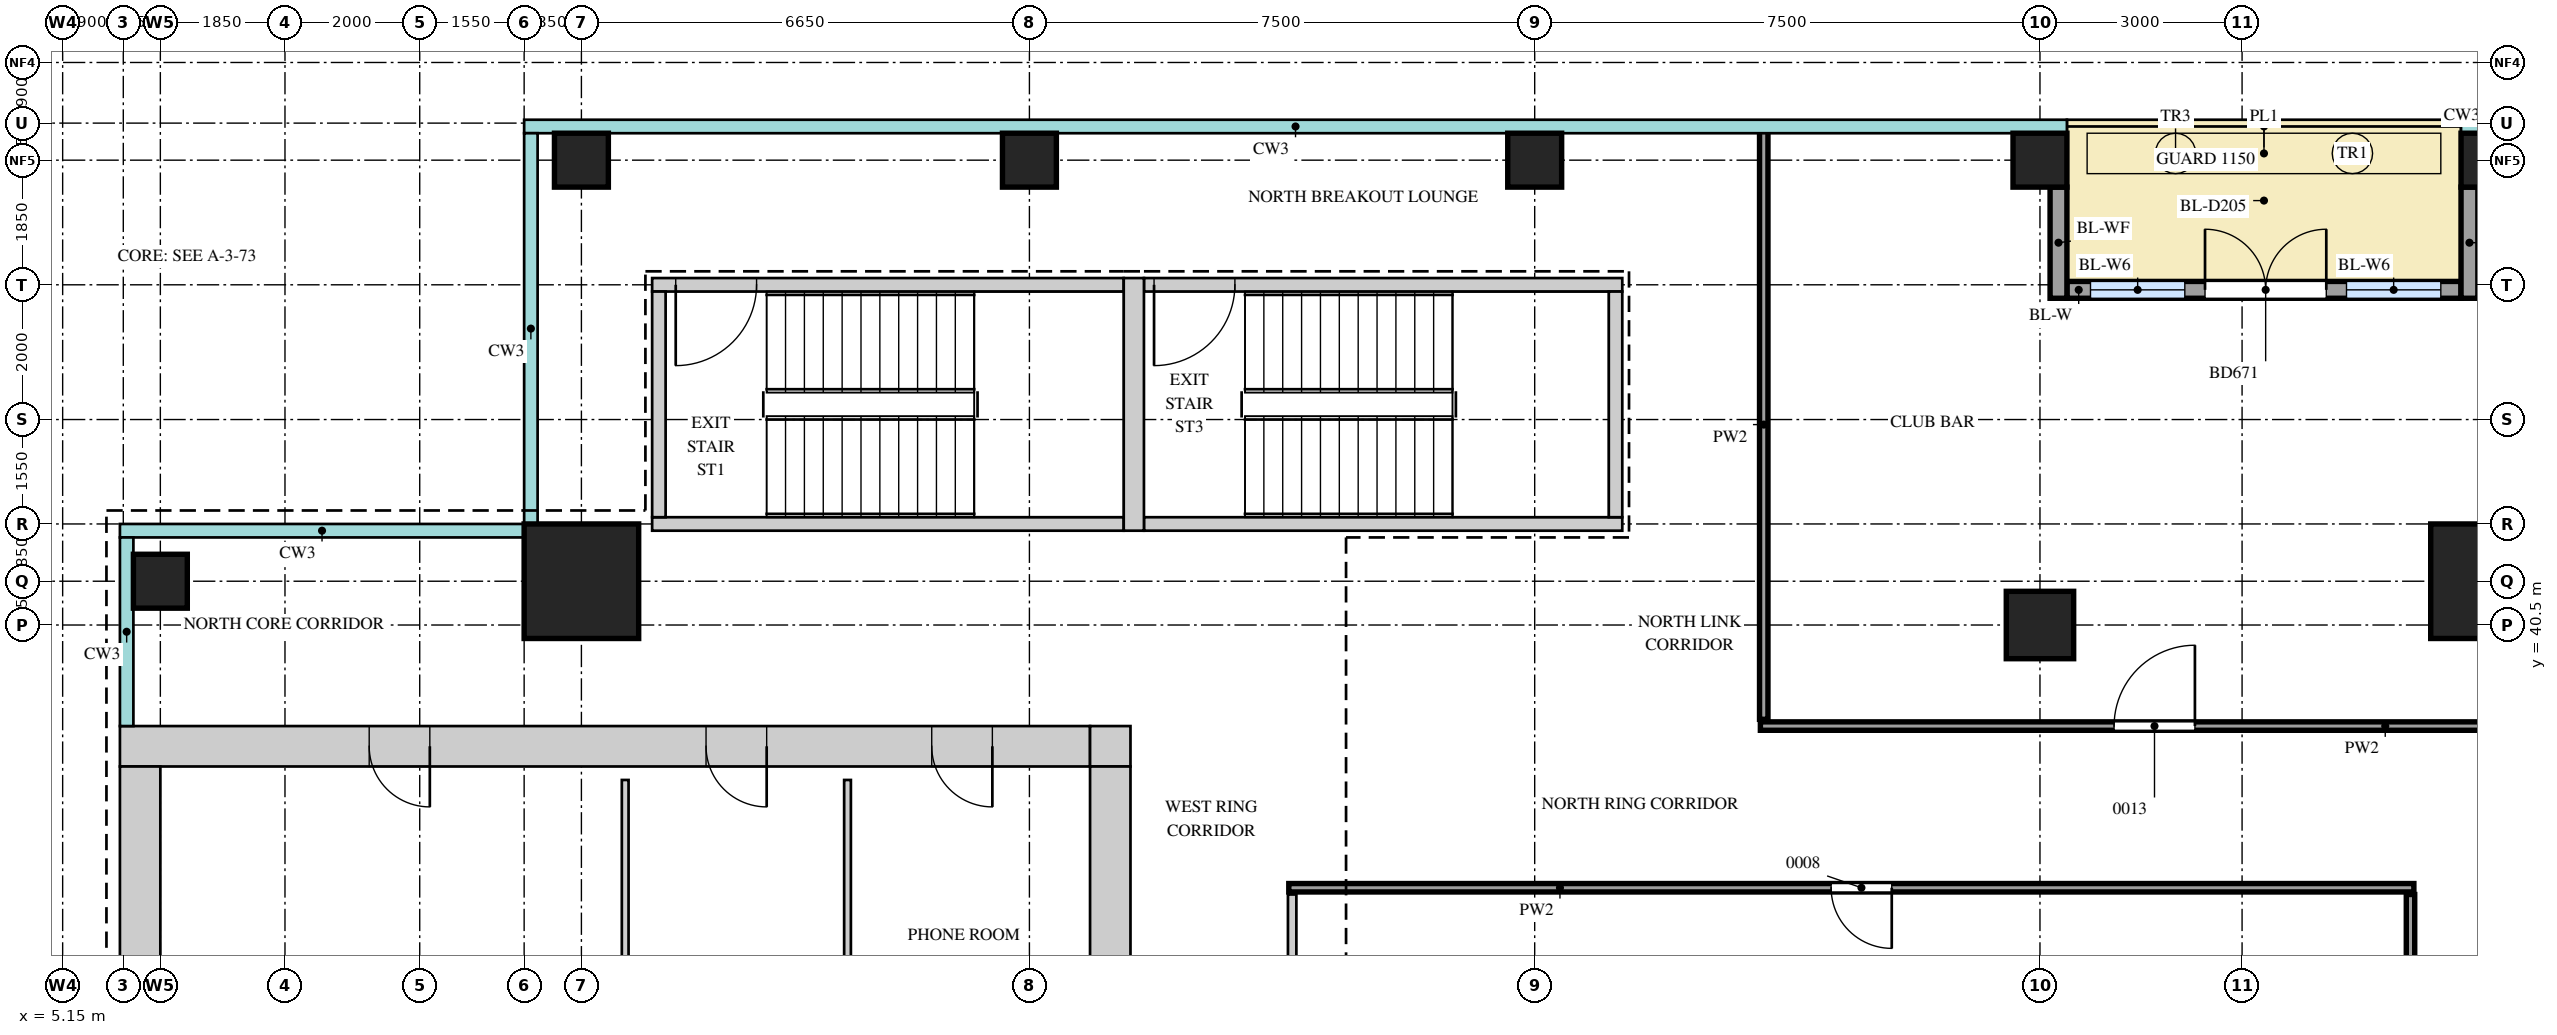
"""IFC4 building model, lengths in metres.
Left out: names, types, materials, properties, quantities, classifications, styles, units other than length and angle.
Written with IfcOpenShell. Run it as: python <this file> out.ifc"""

import sys

from ifc_helpers import new_model, si_unit, direction, frame, frame_2d, origin, origin_2d, place, context, subcontext, project, spatial, rectangle, extrude, source, transform, mapped, element, fill, save


model = new_model("IFC4")
c1 = context("Model", 3, precision=1e-05, world=origin(), true_north=direction((0.0, 1.0)))
c2 = subcontext(c1, "Body", "Model", "MODEL_VIEW")
j1 = project(units=[si_unit("LENGTHUNIT", "METRE"), si_unit("PLANEANGLEUNIT", "RADIAN")], contexts=[c1])
p1 = place(None, origin())
s1 = spatial("IfcSite", under=j1, at=p1, CompositionType="ELEMENT")
p2 = place(p1, origin())
s2 = spatial("IfcBuilding", under=s1, at=p2, CompositionType="ELEMENT")
p3 = place(p2, frame((0.0, 0.0, 298.2)))
s3 = spatial("IfcBuildingStorey", under=s2, at=p3, CompositionType="ELEMENT", Elevation=298.2)
m1 = source(origin(), c2, "Body", "SweptSolid", [
    extrude(rectangle(XDim=14.4, YDim=0.6, at=frame_2d((7.2, 0.0))), origin(), (0.0, 0.0, 1.0), 3.75),
])
p4 = place(p3, frame((6.0, 38.7, 0.0), z_axis=(0.0, 0.0, 1.0), x_axis=(1.0, 0.0, 0.0)))
e1 = element("IfcWall", 1, at=p4, inside=s3, PredefinedType="SHEAR", context=c2, shape_type="MappedRepresentation", body=[
    mapped(m1, transform((0.0, 0.0, 0.0))),
])
m2 = source(origin(), c2, "Body", "SweptSolid", [
    extrude(rectangle(XDim=0.9, YDim=2.1, at=frame_2d((0.45, 1.05))), frame((0.0, 0.31, 0.0), z_axis=(0.0, -1.0, 0.0), x_axis=(1.0, 0.0, 0.0)), (0.0, 0.0, 1.0), 0.62),
])
p5 = place(p4, frame((3.7, 0.0, 0.0)))
e2 = element("IfcOpeningElement", 2, at=p5, cuts=e1, PredefinedType="OPENING", context=c2, shape_type="MappedRepresentation", body=[
    mapped(m2, transform((0.0, 0.0, 0.0))),
])
p6 = place(p4, frame((8.7, 0.0, 0.0)))
e3 = element("IfcOpeningElement", 3, at=p6, cuts=e1, PredefinedType="OPENING", context=c2, shape_type="MappedRepresentation", body=[
    mapped(m2, transform((0.0, 0.0, 0.0))),
])
p7 = place(p4, frame((12.05, 0.0, 0.0)))
e4 = element("IfcOpeningElement", 4, at=p7, cuts=e1, PredefinedType="OPENING", context=c2, shape_type="MappedRepresentation", body=[
    mapped(m2, transform((0.0, 0.0, 0.0))),
])
m3 = source(origin(), c2, "Body", "SweptSolid", [
    extrude(rectangle(XDim=0.6, YDim=0.6, at=frame_2d((0.3, 0.0))), origin(), (0.0, 0.0, 1.0), 3.75),
])
p8 = place(p3, frame((20.4, 38.7, 0.0), z_axis=(0.0, 0.0, 1.0), x_axis=(1.0, 0.0, 0.0)))
e5 = element("IfcWall", 5, at=p8, inside=s3, PredefinedType="SHEAR", context=c2, shape_type="MappedRepresentation", body=[
    mapped(m3, transform((0.0, 0.0, 0.0))),
])
m4 = source(origin(), c2, "Body", "SweptSolid", [
    extrude(rectangle(XDim=22.8, YDim=0.6, at=frame_2d((11.4, 0.0))), origin(), (0.0, 0.0, 1.0), 3.75),
])
p9 = place(p3, frame((20.7, 15.6, 0.0), z_axis=(0.0, 0.0, 1.0), x_axis=(0.0, 1.0, 0.0)))
e6 = element("IfcWall", 6, at=p9, inside=s3, PredefinedType="SHEAR", context=c2, shape_type="MappedRepresentation", body=[
    mapped(m4, transform((0.0, 0.0, 0.0))),
])
m5 = source(origin(), c2, "Body", "SweptSolid", [
    extrude(rectangle(XDim=1.8, YDim=2.1, at=frame_2d((0.9, 1.05))), frame((0.0, 0.31, 0.0), z_axis=(0.0, -1.0, 0.0), x_axis=(1.0, 0.0, 0.0)), (0.0, 0.0, 1.0), 0.62),
])
p10 = place(p9, frame((10.9, 0.0, 0.0)))
e7 = element("IfcOpeningElement", 7, at=p10, cuts=e6, PredefinedType="OPENING", context=c2, shape_type="MappedRepresentation", body=[
    mapped(m5, transform((0.0, 0.0, 0.0))),
])
p11 = place(p9, frame((0.55, 0.0, 0.0)))
e8 = element("IfcOpeningElement", 8, at=p11, cuts=e6, PredefinedType="OPENING", context=c2, shape_type="MappedRepresentation", body=[
    mapped(m2, transform((0.0, 0.0, 0.0))),
])
p12 = place(p9, frame((4.1, 0.0, 0.0)))
e9 = element("IfcOpeningElement", 9, at=p12, cuts=e6, PredefinedType="OPENING", context=c2, shape_type="MappedRepresentation", body=[
    mapped(m2, transform((0.0, 0.0, 0.0))),
])
p13 = place(p3, frame((6.3, 15.6, 0.0), z_axis=(0.0, 0.0, 1.0), x_axis=(0.0, 1.0, 0.0)))
e10 = element("IfcWall", 10, at=p13, inside=s3, PredefinedType="SHEAR", context=c2, shape_type="MappedRepresentation", body=[
    mapped(m4, transform((0.0, 0.0, 0.0))),
])
m6 = source(origin(), c2, "Body", "SweptSolid", [
    extrude(rectangle(XDim=7.0, YDim=0.2, at=frame_2d((3.5, 0.0))), origin(), (0.0, 0.0, 1.0), 3.75),
])
p14 = place(p3, frame((13.9, 45.55, 0.0), z_axis=(0.0, 0.0, 1.0), x_axis=(1.0, 0.0, 0.0)))
e11 = element("IfcWall", 11, at=p14, inside=s3, PredefinedType="SHEAR", context=c2, shape_type="MappedRepresentation", body=[
    mapped(m6, transform((0.0, 0.0, 0.0))),
])
m7 = source(origin(), c2, "Body", "SweptSolid", [
    extrude(rectangle(XDim=1.2, YDim=2.1, at=frame_2d((0.6, 1.05))), frame((0.0, 0.11, 0.0), z_axis=(0.0, -1.0, 0.0), x_axis=(1.0, 0.0, 0.0)), (0.0, 0.0, 1.0), 0.22),
])
p15 = place(p14, frame((0.35, 0.0, 0.0)))
e12 = element("IfcOpeningElement", 12, at=p15, cuts=e11, PredefinedType="OPENING", context=c2, shape_type="MappedRepresentation", body=[
    mapped(m7, transform((0.0, 0.0, 0.0))),
])
p16 = place(p3, frame((13.9, 42.0, 0.0), z_axis=(0.0, 0.0, 1.0), x_axis=(1.0, 0.0, 0.0)))
e13 = element("IfcWall", 13, at=p16, inside=s3, PredefinedType="SHEAR", context=c2, shape_type="MappedRepresentation", body=[
    mapped(m6, transform((0.0, 0.0, 0.0))),
])
m8 = source(origin(), c2, "Body", "SweptSolid", [
    extrude(rectangle(XDim=7.1, YDim=0.2, at=frame_2d((3.55, 0.0))), origin(), (0.0, 0.0, 1.0), 3.75),
])
p17 = place(p3, frame((21.2, 45.55, 0.0), z_axis=(0.0, 0.0, 1.0), x_axis=(1.0, 0.0, 0.0)))
e14 = element("IfcWall", 14, at=p17, inside=s3, PredefinedType="SHEAR", context=c2, shape_type="MappedRepresentation", body=[
    mapped(m8, transform((0.0, 0.0, 0.0))),
])
p18 = place(p17, frame((0.15, 0.0, 0.0)))
e15 = element("IfcOpeningElement", 15, at=p18, cuts=e14, PredefinedType="OPENING", context=c2, shape_type="MappedRepresentation", body=[
    mapped(m7, transform((0.0, 0.0, 0.0))),
])
p19 = place(p3, frame((21.2, 42.0, 0.0), z_axis=(0.0, 0.0, 1.0), x_axis=(1.0, 0.0, 0.0)))
e16 = element("IfcWall", 16, at=p19, inside=s3, PredefinedType="SHEAR", context=c2, shape_type="MappedRepresentation", body=[
    mapped(m8, transform((0.0, 0.0, 0.0))),
])
m9 = source(origin(), c2, "Body", "SweptSolid", [
    extrude(rectangle(XDim=3.75, YDim=0.3, at=frame_2d((1.875, 0.0))), origin(), (0.0, 0.0, 1.0), 3.75),
])
p20 = place(p3, frame((21.05, 41.9, 0.0), z_axis=(0.0, 0.0, 1.0), x_axis=(0.0, 1.0, 0.0)))
e17 = element("IfcWall", 17, at=p20, inside=s3, PredefinedType="SHEAR", context=c2, shape_type="MappedRepresentation", body=[
    mapped(m9, transform((0.0, 0.0, 0.0))),
])
m10 = source(origin(), c2, "Body", "SweptSolid", [
    extrude(rectangle(XDim=3.35, YDim=0.2, at=frame_2d((1.675, 0.0))), origin(), (0.0, 0.0, 1.0), 3.75),
])
for number, where, z_axis, x_axis in (
    (18, (14.0, 42.1, 0.0), (0.0, 0.0, 1.0), (0.0, 1.0, 0.0)),
    (19, (28.2, 42.1, 0.0), (0.0, 0.0, 1.0), (0.0, 1.0, 0.0)),
):
    element("IfcWall", number, at=place(p3, frame(where, z_axis=z_axis, x_axis=x_axis)), inside=s3, PredefinedType="SHEAR", context=c2, shape_type="MappedRepresentation", body=[
        mapped(m10, transform((0.0, 0.0, 0.0))),
    ])
m11 = source(origin(), c2, "Body", "SweptSolid", [
    extrude(rectangle(XDim=1.7, YDim=1.7, at=origin_2d()), origin(), (0.0, 0.0, 1.0), 3.75),
])
for number, where, z_axis, x_axis in (
    (20, (41.15, 41.15, 0.0), (0.0, 0.0, 1.0), (1.0, 0.0, 0.0)),
    (21, (12.85, 41.15, 0.0), (0.0, 0.0, 1.0), (1.0, 0.0, 0.0)),
):
    element("IfcColumn", number, at=place(p3, frame(where, z_axis=z_axis, x_axis=x_axis)), inside=s3, PredefinedType="COLUMN", context=c2, shape_type="MappedRepresentation", body=[
        mapped(m11, transform((0.0, 0.0, 0.0))),
    ])
m12 = source(origin(), c2, "Body", "SweptSolid", [
    extrude(rectangle(XDim=0.8, YDim=0.8, at=origin_2d()), origin(), (0.0, 0.0, 1.0), 3.75),
])
for number, where, z_axis, x_axis in (
    (22, (12.85, 47.4, 0.0), (0.0, 0.0, 1.0), (1.0, 0.0, 0.0)),
    (23, (19.5, 47.4, 0.0), (0.0, 0.0, 1.0), (1.0, 0.0, 0.0)),
    (24, (27.0, 47.4, 0.0), (0.0, 0.0, 1.0), (1.0, 0.0, 0.0)),
    (25, (34.5, 47.4, 0.0), (0.0, 0.0, 1.0), (1.0, 0.0, 0.0)),
    (26, (41.15, 47.4, 0.0), (0.0, 0.0, 1.0), (1.0, 0.0, 0.0)),
    (27, (6.6, 41.15, 0.0), (0.0, 0.0, 1.0), (1.0, 0.0, 0.0)),
):
    element("IfcColumn", number, at=place(p3, frame(where, z_axis=z_axis, x_axis=x_axis)), inside=s3, PredefinedType="COLUMN", context=c2, shape_type="MappedRepresentation", body=[
        mapped(m12, transform((0.0, 0.0, 0.0))),
    ])
m13 = source(origin(), c2, "Body", "SweptSolid", [
    extrude(rectangle(XDim=1.0, YDim=1.0, at=origin_2d()), origin(), (0.0, 0.0, 1.0), 3.75),
])
p21 = place(p3, frame((34.5, 40.5, 0.0), z_axis=(0.0, 0.0, 1.0), x_axis=(1.0, 0.0, 0.0)))
e28 = element("IfcColumn", 28, at=p21, inside=s3, PredefinedType="COLUMN", context=c2, shape_type="MappedRepresentation", body=[
    mapped(m13, transform((0.0, 0.0, 0.0))),
])
m14 = source(origin(), c2, "Body", "SweptSolid", [
    extrude(rectangle(XDim=5.85, YDim=0.25, at=frame_2d((2.925, 0.0))), origin(), (0.0, 0.0, 1.0), 3.75),
])
p22 = place(p3, frame((34.9, 45.475, 0.0), z_axis=(0.0, 0.0, 1.0), x_axis=(1.0, 0.0, 0.0)))
e29 = element("IfcWall", 29, at=p22, inside=s3, PredefinedType="SOLIDWALL", context=c2, shape_type="MappedRepresentation", body=[
    mapped(m14, transform((0.0, 0.0, 0.0))),
])
m15 = source(origin(), c2, "Body", "SweptSolid", [
    extrude(rectangle(XDim=1.4, YDim=2.4, at=frame_2d((0.7, 1.2))), frame((0.0, 0.135, 0.0), z_axis=(0.0, -1.0, 0.0), x_axis=(1.0, 0.0, 0.0)), (0.0, 0.0, 1.0), 0.27),
])
p23 = place(p22, frame((0.35, 0.0, 0.0)))
e30 = element("IfcOpeningElement", 30, at=p23, cuts=e29, PredefinedType="OPENING", context=c2, shape_type="MappedRepresentation", body=[
    mapped(m15, transform((0.0, 0.0, 0.0))),
])
p24 = place(p22, frame((4.15, 0.0, 0.0)))
e31 = element("IfcOpeningElement", 31, at=p24, cuts=e29, PredefinedType="OPENING", context=c2, shape_type="MappedRepresentation", body=[
    mapped(m15, transform((0.0, 0.0, 0.0))),
])
m16 = source(origin(), c2, "Body", "SweptSolid", [
    extrude(rectangle(XDim=1.8, YDim=2.4, at=frame_2d((0.9, 1.2))), frame((0.0, 0.135, 0.0), z_axis=(0.0, -1.0, 0.0), x_axis=(1.0, 0.0, 0.0)), (0.0, 0.0, 1.0), 0.27),
])
p25 = place(p22, frame((2.05, 0.0, 0.0)))
e32 = element("IfcOpeningElement", 32, at=p25, cuts=e29, PredefinedType="OPENING", context=c2, shape_type="MappedRepresentation", body=[
    mapped(m16, transform((0.0, 0.0, 0.0))),
])
m17 = source(origin(), c2, "Body", "SweptSolid", [
    extrude(rectangle(XDim=1.65, YDim=0.25, at=frame_2d((0.825, 0.0))), origin(), (0.0, 0.0, 1.0), 3.45),
])
for number, where, z_axis, x_axis in (
    (33, (34.775, 47.0, 0.0), (0.0, 0.0, 1.0), (0.0, -1.0, 0.0)),
    (34, (40.875, 47.0, 0.0), (0.0, 0.0, 1.0), (0.0, -1.0, 0.0)),
):
    element("IfcWall", number, at=place(p3, frame(where, z_axis=z_axis, x_axis=x_axis)), inside=s3, PredefinedType="SOLIDWALL", context=c2, shape_type="MappedRepresentation", body=[
        mapped(m17, transform((0.0, 0.0, 0.0))),
    ])
m18 = source(origin(), c2, "Body", "SweptSolid", [
    extrude(rectangle(XDim=19.0, YDim=0.125, at=frame_2d((9.5, 0.0))), origin(), (0.0, 0.0, 1.0), 3.8),
])
p26 = place(p3, frame((23.4, 17.5, 0.0), z_axis=(0.0, 0.0, 1.0), x_axis=(0.0, 1.0, 0.0)))
e35 = element("IfcWall", 35, at=p26, inside=s3, PredefinedType="PARTITIONING", context=c2, shape_type="MappedRepresentation", body=[
    mapped(m18, transform((0.0, 0.0, 0.0))),
])
m19 = source(origin(), c2, "Body", "SweptSolid", [
    extrude(rectangle(XDim=0.9, YDim=2.1, at=frame_2d((0.45, 1.05))), frame((0.0, 0.073, 0.0), z_axis=(0.0, -1.0, 0.0), x_axis=(1.0, 0.0, 0.0)), (0.0, 0.0, 1.0), 0.145),
])
p27 = place(p26, frame((8.4, 0.0, 0.0)))
e36 = element("IfcOpeningElement", 36, at=p27, cuts=e35, PredefinedType="OPENING", context=c2, shape_type="MappedRepresentation", body=[
    mapped(m19, transform((0.0, 0.0, 0.0))),
])
p28 = place(p3, frame((40.0, 17.5, 0.0), z_axis=(0.0, 0.0, 1.0), x_axis=(0.0, 1.0, 0.0)))
e37 = element("IfcWall", 37, at=p28, inside=s3, PredefinedType="PARTITIONING", context=c2, shape_type="MappedRepresentation", body=[
    mapped(m18, transform((0.0, 0.0, 0.0))),
])
m20 = source(origin(), c2, "Body", "SweptSolid", [
    extrude(rectangle(XDim=6.0, YDim=0.1, at=frame_2d((3.0, 0.0))), origin(), (0.0, 0.0, 1.0), 3.8),
])
p29 = place(p3, frame((13.5, 32.2, 0.0), z_axis=(0.0, 0.0, 1.0), x_axis=(0.0, 1.0, 0.0)))
e38 = element("IfcWall", 38, at=p29, inside=s3, PredefinedType="PARTITIONING", context=c2, shape_type="MappedRepresentation", body=[
    mapped(m20, transform((0.0, 0.0, 0.0))),
])
m21 = source(origin(), c2, "Body", "SweptSolid", [
    extrude(rectangle(XDim=5.9, YDim=0.1, at=frame_2d((2.95, 0.0))), origin(), (0.0, 0.0, 1.0), 3.8),
])
p30 = place(p3, frame((16.8, 32.3, 0.0), z_axis=(0.0, 0.0, 1.0), x_axis=(0.0, 1.0, 0.0)))
e39 = element("IfcWall", 39, at=p30, inside=s3, PredefinedType="PARTITIONING", context=c2, shape_type="MappedRepresentation", body=[
    mapped(m21, transform((0.0, 0.0, 0.0))),
])
m22 = source(origin(), c2, "Body", "SweptSolid", [
    extrude(rectangle(XDim=16.7, YDim=0.125, at=frame_2d((8.35, 0.0))), origin(), (0.0, 0.0, 1.0), 3.8),
])
p31 = place(p3, frame((23.35, 36.6, 0.0), z_axis=(0.0, 0.0, 1.0), x_axis=(1.0, 0.0, 0.0)))
e40 = element("IfcWall", 40, at=p31, inside=s3, PredefinedType="PARTITIONING", context=c2, shape_type="MappedRepresentation", body=[
    mapped(m22, transform((0.0, 0.0, 0.0))),
])
p32 = place(p31, frame((8.05, 0.0, 0.0)))
e41 = element("IfcOpeningElement", 41, at=p32, cuts=e40, PredefinedType="OPENING", context=c2, shape_type="MappedRepresentation", body=[
    mapped(m19, transform((0.0, 0.0, 0.0))),
])
m23 = source(origin(), c2, "Body", "SweptSolid", [
    extrude(rectangle(XDim=12.1, YDim=0.125, at=frame_2d((6.05, 0.0))), origin(), (0.0, 0.0, 1.0), 3.8),
])
p33 = place(p3, frame((30.35, 39.0, 0.0), z_axis=(0.0, 0.0, 1.0), x_axis=(1.0, 0.0, 0.0)))
e42 = element("IfcWall", 42, at=p33, inside=s3, PredefinedType="PARTITIONING", context=c2, shape_type="MappedRepresentation", body=[
    mapped(m23, transform((0.0, 0.0, 0.0))),
])
m24 = source(origin(), c2, "Body", "SweptSolid", [
    extrude(rectangle(XDim=1.2, YDim=2.1, at=frame_2d((0.6, 1.05))), frame((0.0, 0.073, 0.0), z_axis=(0.0, -1.0, 0.0), x_axis=(1.0, 0.0, 0.0)), (0.0, 0.0, 1.0), 0.145),
])
p34 = place(p33, frame((5.25, 0.0, 0.0)))
e43 = element("IfcOpeningElement", 43, at=p34, cuts=e42, PredefinedType="OPENING", context=c2, shape_type="MappedRepresentation", body=[
    mapped(m24, transform((0.0, 0.0, 0.0))),
])
m25 = source(origin(), c2, "Body", "SweptSolid", [
    extrude(rectangle(XDim=8.75, YDim=0.125, at=frame_2d((4.375, 0.0))), origin(), (0.0, 0.0, 1.0), 3.8),
])
p35 = place(p3, frame((30.4, 39.1, 0.0), z_axis=(0.0, 0.0, 1.0), x_axis=(0.0, 1.0, 0.0)))
e44 = element("IfcWall", 44, at=p35, inside=s3, PredefinedType="PARTITIONING", context=c2, shape_type="MappedRepresentation", body=[
    mapped(m25, transform((0.0, 0.0, 0.0))),
])
m26 = source(origin(), c2, "Body", "SweptSolid", [
    extrude(rectangle(XDim=1.4, YDim=2.4, at=frame_2d((0.7, 1.2))), frame((0.0, 0.03, 0.0), z_axis=(0.0, -1.0, 0.0), x_axis=(1.0, 0.0, 0.0)), (0.0, 0.0, 1.0), 0.06),
])
p36 = place(p23, origin())
e45 = element("IfcWindow", 45, at=p36, inside=s3, PartitioningType="SINGLE_PANEL", PredefinedType="WINDOW", context=c2, shape_type="MappedRepresentation", body=[
    mapped(m26, transform((0.0, 0.0, 0.0))),
])
fill(e30, e45)
p37 = place(p24, origin())
e46 = element("IfcWindow", 46, at=p37, inside=s3, PartitioningType="SINGLE_PANEL", PredefinedType="WINDOW", context=c2, shape_type="MappedRepresentation", body=[
    mapped(m26, transform((0.0, 0.0, 0.0))),
])
fill(e31, e46)
m27 = source(origin(), c2, "Body", "SweptSolid", [
    extrude(rectangle(XDim=1.8, YDim=2.4, at=frame_2d((0.9, 1.2))), frame((0.0, 0.025, 0.0), z_axis=(0.0, -1.0, 0.0), x_axis=(1.0, 0.0, 0.0)), (0.0, 0.0, 1.0), 0.05),
])
p38 = place(p25, origin())
e47 = element("IfcDoor", 47, at=p38, inside=s3, OperationType="DOUBLE_DOOR_DOUBLE_SWING", PredefinedType="DOOR", context=c2, shape_type="MappedRepresentation", body=[
    mapped(m27, transform((0.0, 0.0, 0.0))),
])
fill(e32, e47)
m28 = source(origin(), c2, "Body", "SweptSolid", [
    extrude(rectangle(XDim=0.9, YDim=2.1, at=frame_2d((0.45, 1.05))), frame((0.0, 0.25, 0.0), z_axis=(0.0, -1.0, 0.0), x_axis=(1.0, 0.0, 0.0)), (0.0, 0.0, 1.0), 0.5),
])
p39 = place(p5, origin())
e48 = element("IfcDoor", 48, at=p39, inside=s3, OperationType="SINGLE_SWING_RIGHT", PredefinedType="DOOR", context=c2, shape_type="MappedRepresentation", body=[
    mapped(m28, transform((0.0, 0.0, 0.0))),
])
fill(e2, e48)
p40 = place(p6, origin())
e49 = element("IfcDoor", 49, at=p40, inside=s3, OperationType="SINGLE_SWING_RIGHT", PredefinedType="DOOR", context=c2, shape_type="MappedRepresentation", body=[
    mapped(m28, transform((0.0, 0.0, 0.0))),
])
fill(e3, e49)
p41 = place(p7, origin())
e50 = element("IfcDoor", 50, at=p41, inside=s3, OperationType="SINGLE_SWING_RIGHT", PredefinedType="DOOR", context=c2, shape_type="MappedRepresentation", body=[
    mapped(m28, transform((0.0, 0.0, 0.0))),
])
fill(e4, e50)
m29 = source(origin(), c2, "Body", "SweptSolid", [
    extrude(rectangle(XDim=1.2, YDim=2.1, at=frame_2d((0.6, 1.05))), frame((0.0, 0.025, 0.0), z_axis=(0.0, -1.0, 0.0), x_axis=(1.0, 0.0, 0.0)), (0.0, 0.0, 1.0), 0.05),
])
p42 = place(p34, origin())
e51 = element("IfcDoor", 51, at=p42, inside=s3, OperationType="SINGLE_SWING_LEFT", PredefinedType="DOOR", context=c2, shape_type="MappedRepresentation", body=[
    mapped(m29, transform((0.0, 0.0, 0.0))),
])
fill(e43, e51)
m30 = source(origin(), c2, "Body", "SweptSolid", [
    extrude(rectangle(XDim=0.9, YDim=2.1, at=frame_2d((0.45, 1.05))), frame((0.0, 0.025, 0.0), z_axis=(0.0, -1.0, 0.0), x_axis=(1.0, 0.0, 0.0)), (0.0, 0.0, 1.0), 0.05),
])
p43 = place(p32, origin())
e52 = element("IfcDoor", 52, at=p43, inside=s3, OperationType="SINGLE_SWING_RIGHT", PredefinedType="DOOR", context=c2, shape_type="MappedRepresentation", body=[
    mapped(m30, transform((0.0, 0.0, 0.0))),
])
fill(e41, e52)
p44 = place(p15, origin())
e53 = element("IfcDoor", 53, at=p44, inside=s3, OperationType="SINGLE_SWING_LEFT", PredefinedType="DOOR", context=c2, shape_type="MappedRepresentation", body=[
    mapped(m29, transform((0.0, 0.0, 0.0))),
])
fill(e12, e53)
p45 = place(p18, origin())
e54 = element("IfcDoor", 54, at=p45, inside=s3, OperationType="SINGLE_SWING_LEFT", PredefinedType="DOOR", context=c2, shape_type="MappedRepresentation", body=[
    mapped(m29, transform((0.0, 0.0, 0.0))),
])
fill(e15, e54)
save(model, sys.argv[1])
